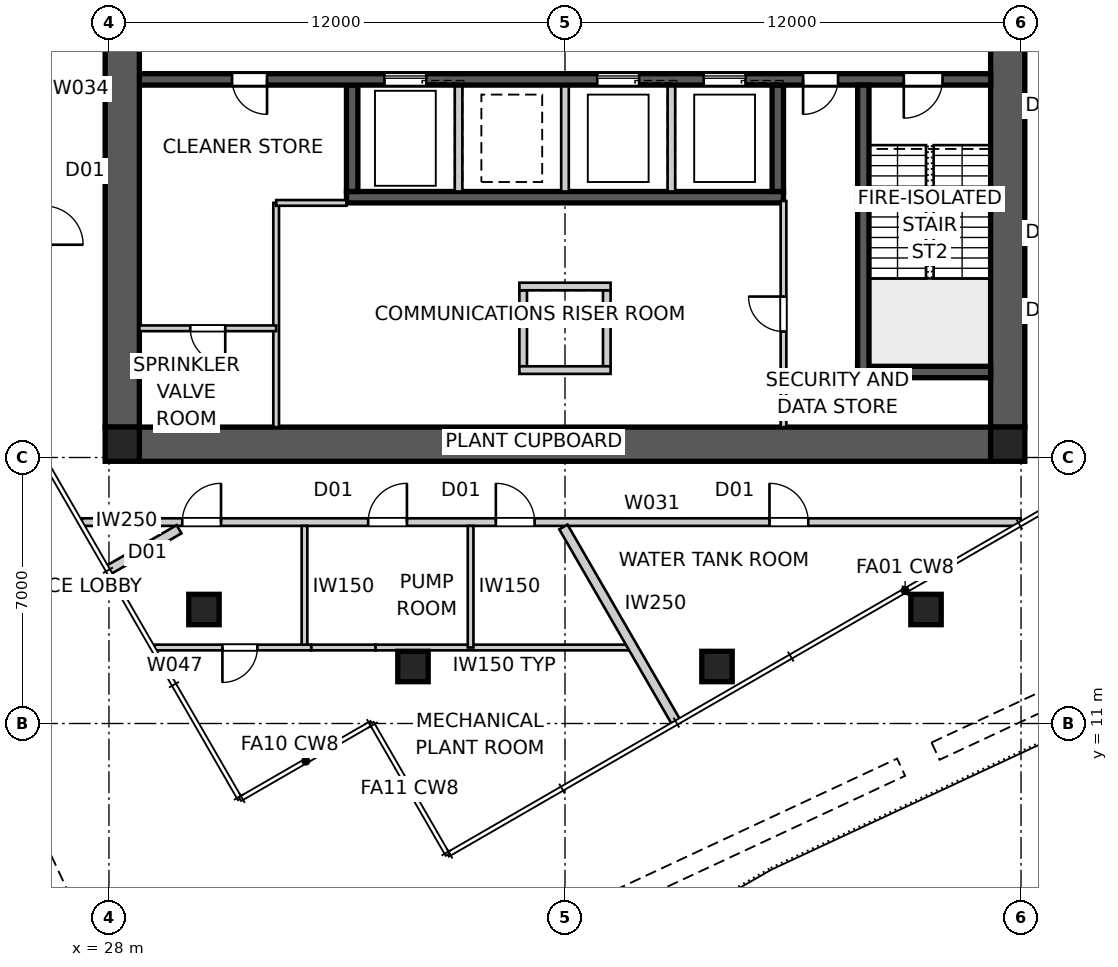
"""IFC4 building model, lengths in metres.
Left out: names, types, materials, properties, quantities, classifications, styles, units other than length and angle.
Written with IfcOpenShell. Run it as: python <this file> out.ifc"""

import sys

from ifc_helpers import new_model, si_unit, direction, frame, frame_2d, origin, origin_2d, place, context, subcontext, project, spatial, polyline, rectangle, outline, extrude, element, fill, save


model = new_model("IFC4")
c1 = context("Model", 3, precision=1e-05, world=origin(), true_north=direction((0.0, 1.0)))
c2 = subcontext(c1, "Body", "Model", "MODEL_VIEW")
j1 = project(units=[si_unit("LENGTHUNIT", "METRE"), si_unit("PLANEANGLEUNIT", "RADIAN")], contexts=[c1])
p1 = place(None, origin())
s1 = spatial("IfcSite", under=j1, at=p1, CompositionType="ELEMENT")
p2 = place(p1, origin())
s2 = spatial("IfcBuilding", under=s1, at=p2, CompositionType="ELEMENT")
p3 = place(p2, frame((0.0, 0.0, 203.2)))
s3 = spatial("IfcBuildingStorey", under=s2, at=p3, CompositionType="ELEMENT", Elevation=203.2)
p4 = place(p3, frame((51.2, 18.35, 0.0), z_axis=(0.0, 0.0, 1.0), x_axis=(-1.0, 0.0, 0.0)))
e1 = element("IfcWall", 1, at=p4, inside=s3, PredefinedType="SHEAR", context=c2, shape_type="SweptSolid", body=[
    extrude(outline(polyline([(0.0, -0.45), (22.4, -0.45), (22.4, -0.025), (22.85, -0.025), (22.85, 0.025), (22.4, 0.025), (22.4, 0.45), (0.0, 0.45), (0.0, 0.025), (-0.45, 0.025), (-0.45, -0.025), (0.0, -0.025), (0.0, -0.45)])), origin(), (0.0, 0.0, 1.0), 5.0),
])
p5 = place(p3, frame((51.65, 18.8, 0.0), z_axis=(0.0, 0.0, 1.0), x_axis=(0.0, 1.0, 0.0)))
e2 = element("IfcWall", 2, at=p5, inside=s3, PredefinedType="SHEAR", context=c2, shape_type="SweptSolid", body=[
    extrude(outline(polyline([(0.0, -0.45), (22.4, -0.45), (22.4, -0.025), (22.85, -0.025), (22.85, 0.025), (22.4, 0.025), (22.4, 0.45), (0.0, 0.45), (0.0, 0.025), (-0.45, 0.025), (-0.45, -0.025), (0.0, -0.025), (0.0, -0.45)])), origin(), (0.0, 0.0, 1.0), 5.0),
])
p6 = place(p5, frame((11.14, 0.0, 0.0)))
e3 = element("IfcOpeningElement", 3, at=p6, cuts=e2, PredefinedType="OPENING", context=c2, shape_type="SweptSolid", body=[
    extrude(rectangle(XDim=1.02, YDim=2.4, at=frame_2d((0.51, 1.2))), frame((0.0, 0.46, 0.0), z_axis=(0.0, -1.0, 0.0), x_axis=(1.0, 0.0, 0.0)), (0.0, 0.0, 1.0), 0.92),
])
p7 = place(p3, frame((28.35, 41.2, 0.0), z_axis=(0.0, 0.0, 1.0), x_axis=(0.0, -1.0, 0.0)))
e4 = element("IfcWall", 4, at=p7, inside=s3, PredefinedType="SHEAR", context=c2, shape_type="SweptSolid", body=[
    extrude(outline(polyline([(0.0, -0.45), (22.4, -0.45), (22.4, -0.025), (22.85, -0.025), (22.85, 0.025), (22.4, 0.025), (22.4, 0.45), (0.0, 0.45), (0.0, 0.025), (-0.45, 0.025), (-0.45, -0.025), (0.0, -0.025), (0.0, -0.45)])), origin(), (0.0, 0.0, 1.0), 5.0),
])
p8 = place(p7, frame((11.14, 0.0, 0.0)))
e5 = element("IfcOpeningElement", 5, at=p8, cuts=e4, PredefinedType="OPENING", context=c2, shape_type="SweptSolid", body=[
    extrude(rectangle(XDim=1.02, YDim=2.4, at=frame_2d((0.51, 1.2))), frame((0.0, 0.46, 0.0), z_axis=(0.0, -1.0, 0.0), x_axis=(1.0, 0.0, 0.0)), (0.0, 0.0, 1.0), 0.92),
])
p9 = place(p3, frame((51.2, 27.95, 0.0), z_axis=(0.0, 0.0, 1.0), x_axis=(-1.0, 0.0, 0.0)))
e6 = element("IfcWall", 6, at=p9, inside=s3, PredefinedType="SHEAR", context=c2, shape_type="SweptSolid", body=[
    extrude(rectangle(XDim=22.4, YDim=0.3, at=frame_2d((11.2, 0.0))), origin(), (0.0, 0.0, 1.0), 5.0),
])
p10 = place(p9, frame((19.04, 0.0, 0.0)))
e7 = element("IfcOpeningElement", 7, at=p10, cuts=e6, PredefinedType="OPENING", context=c2, shape_type="SweptSolid", body=[
    extrude(rectangle(XDim=0.92, YDim=2.1, at=frame_2d((0.46, 1.05))), frame((0.0, 0.16, 0.0), z_axis=(0.0, -1.0, 0.0), x_axis=(1.0, 0.0, 0.0)), (0.0, 0.0, 1.0), 0.32),
])
p11 = place(p9, frame((1.265, 0.0, 0.0)))
e8 = element("IfcOpeningElement", 8, at=p11, cuts=e6, PredefinedType="OPENING", context=c2, shape_type="SweptSolid", body=[
    extrude(rectangle(XDim=1.02, YDim=2.1, at=frame_2d((0.51, 1.05))), frame((0.0, 0.16, 0.0), z_axis=(0.0, -1.0, 0.0), x_axis=(1.0, 0.0, 0.0)), (0.0, 0.0, 1.0), 0.32),
])
p12 = place(p9, frame((4.015, 0.0, 0.0)))
e9 = element("IfcOpeningElement", 9, at=p12, cuts=e6, PredefinedType="OPENING", context=c2, shape_type="SweptSolid", body=[
    extrude(rectangle(XDim=0.92, YDim=2.1, at=frame_2d((0.46, 1.05))), frame((0.0, 0.16, 0.0), z_axis=(0.0, -1.0, 0.0), x_axis=(1.0, 0.0, 0.0)), (0.0, 0.0, 1.0), 0.32),
])
p13 = place(p9, frame((6.45, 0.0, 0.0)))
e10 = element("IfcOpeningElement", 10, at=p13, cuts=e6, PredefinedType="OPENING", context=c2, shape_type="SweptSolid", body=[
    extrude(rectangle(XDim=1.1, YDim=2.1, at=frame_2d((0.55, 1.05))), frame((0.0, 0.16, 0.0), z_axis=(0.0, -1.0, 0.0), x_axis=(1.0, 0.0, 0.0)), (0.0, 0.0, 1.0), 0.32),
])
p14 = place(p9, frame((9.25, 0.0, 0.0)))
e11 = element("IfcOpeningElement", 11, at=p14, cuts=e6, PredefinedType="OPENING", context=c2, shape_type="SweptSolid", body=[
    extrude(rectangle(XDim=1.1, YDim=2.1, at=frame_2d((0.55, 1.05))), frame((0.0, 0.16, 0.0), z_axis=(0.0, -1.0, 0.0), x_axis=(1.0, 0.0, 0.0)), (0.0, 0.0, 1.0), 0.32),
])
p15 = place(p9, frame((14.85, 0.0, 0.0)))
e12 = element("IfcOpeningElement", 12, at=p15, cuts=e6, PredefinedType="OPENING", context=c2, shape_type="SweptSolid", body=[
    extrude(rectangle(XDim=1.1, YDim=2.1, at=frame_2d((0.55, 1.05))), frame((0.0, 0.16, 0.0), z_axis=(0.0, -1.0, 0.0), x_axis=(1.0, 0.0, 0.0)), (0.0, 0.0, 1.0), 0.32),
])
p16 = place(p3, frame((45.75, 24.85, 0.0), z_axis=(0.0, 0.0, 1.0), x_axis=(-1.0, 0.0, 0.0)))
e13 = element("IfcWall", 13, at=p16, inside=s3, PredefinedType="SHEAR", context=c2, shape_type="SweptSolid", body=[
    extrude(rectangle(XDim=11.5, YDim=0.3, at=frame_2d((5.75, 0.0))), origin(), (0.0, 0.0, 1.0), 5.0),
])
p17 = place(p3, frame((45.6, 27.8, 0.0), z_axis=(0.0, 0.0, 1.0), x_axis=(0.0, -1.0, 0.0)))
e14 = element("IfcWall", 14, at=p17, inside=s3, PredefinedType="SHEAR", context=c2, shape_type="SweptSolid", body=[
    extrude(rectangle(XDim=2.8, YDim=0.3, at=frame_2d((1.4, 0.0))), origin(), (0.0, 0.0, 1.0), 5.0),
])
for number, where, z_axis, x_axis in (
    (15, (42.8, 27.8, 0.0), (0.0, 0.0, 1.0), (0.0, -1.0, 0.0)),
    (16, (40.0, 27.8, 0.0), (0.0, 0.0, 1.0), (0.0, -1.0, 0.0)),
    (17, (37.2, 27.8, 0.0), (0.0, 0.0, 1.0), (0.0, -1.0, 0.0)),
):
    element("IfcWall", number, at=place(p3, frame(where, z_axis=z_axis, x_axis=x_axis)), inside=s3, PredefinedType="SOLIDWALL", context=c2, shape_type="SweptSolid", body=[
        extrude(rectangle(XDim=2.8, YDim=0.2, at=frame_2d((1.4, 0.0))), origin(), (0.0, 0.0, 1.0), 5.0),
    ])
p18 = place(p3, frame((34.4, 27.8, 0.0), z_axis=(0.0, 0.0, 1.0), x_axis=(0.0, -1.0, 0.0)))
e18 = element("IfcWall", 18, at=p18, inside=s3, PredefinedType="SHEAR", context=c2, shape_type="SweptSolid", body=[
    extrude(rectangle(XDim=2.8, YDim=0.3, at=frame_2d((1.4, 0.0))), origin(), (0.0, 0.0, 1.0), 5.0),
])
p19 = place(p3, frame((47.85, 27.8, 0.0), z_axis=(0.0, 0.0, 1.0), x_axis=(0.0, -1.0, 0.0)))
e19 = element("IfcWall", 19, at=p19, inside=s3, PredefinedType="SHEAR", context=c2, shape_type="SweptSolid", body=[
    extrude(rectangle(XDim=7.7, YDim=0.3, at=frame_2d((3.85, 0.0))), origin(), (0.0, 0.0, 1.0), 5.0),
])
p20 = place(p3, frame((51.2, 20.25, 0.0), z_axis=(0.0, 0.0, 1.0), x_axis=(-1.0, 0.0, 0.0)))
e20 = element("IfcWall", 20, at=p20, inside=s3, PredefinedType="SHEAR", context=c2, shape_type="SweptSolid", body=[
    extrude(rectangle(XDim=3.5, YDim=0.3, at=frame_2d((1.75, 0.0))), origin(), (0.0, 0.0, 1.0), 5.0),
])
for number, where, z_axis, x_axis in (
    (21, (38.9, 22.4, 0.0), (0.0, 0.0, 1.0), (0.0, -1.0, 0.0)),
    (22, (41.1, 22.4, 0.0), (0.0, 0.0, 1.0), (0.0, -1.0, 0.0)),
):
    element("IfcWall", number, at=place(p3, frame(where, z_axis=z_axis, x_axis=x_axis)), inside=s3, PredefinedType="SOLIDWALL", context=c2, shape_type="SweptSolid", body=[
        extrude(rectangle(XDim=2.0, YDim=0.2, at=frame_2d((1.0, 0.0))), origin(), (0.0, 0.0, 1.0), 5.0),
    ])
for number, where, z_axis, x_axis in (
    (23, (38.8, 22.5, 0.0), (0.0, 0.0, 1.0), (1.0, 0.0, 0.0)),
    (24, (38.8, 20.3, 0.0), (0.0, 0.0, 1.0), (1.0, 0.0, 0.0)),
):
    element("IfcWall", number, at=place(p3, frame(where, z_axis=z_axis, x_axis=x_axis)), inside=s3, PredefinedType="SOLIDWALL", context=c2, shape_type="SweptSolid", body=[
        extrude(rectangle(XDim=2.4, YDim=0.2, at=frame_2d((1.2, 0.0))), origin(), (0.0, 0.0, 1.0), 5.0),
    ])
for number, where, z_axis, x_axis in (
    (25, (28.35, 18.35, 0.0), (0.0, 0.0, 1.0), (1.0, 0.0, 0.0)),
    (26, (51.65, 18.35, 0.0), (0.0, 0.0, 1.0), (1.0, 0.0, 0.0)),
):
    element("IfcColumn", number, at=place(p3, frame(where, z_axis=z_axis, x_axis=x_axis)), inside=s3, PredefinedType="COLUMN", context=c2, shape_type="SweptSolid", body=[
        extrude(rectangle(XDim=0.9, YDim=0.9, at=origin_2d()), origin(), (0.0, 0.0, 1.0), 5.0),
    ])
for number, where, z_axis, x_axis in (
    (27, (30.5, 14.0, 0.0), (0.0, 0.0, 1.0), (1.0, 0.0, 0.0)),
    (28, (36.0, 12.5, 0.0), (0.0, 0.0, 1.0), (1.0, 0.0, 0.0)),
    (29, (44.0, 12.5, 0.0), (0.0, 0.0, 1.0), (1.0, 0.0, 0.0)),
    (30, (49.5, 14.0, 0.0), (0.0, 0.0, 1.0), (1.0, 0.0, 0.0)),
):
    element("IfcColumn", number, at=place(p3, frame(where, z_axis=z_axis, x_axis=x_axis)), inside=s3, PredefinedType="COLUMN", context=c2, shape_type="SweptSolid", body=[
        extrude(rectangle(XDim=0.8, YDim=0.8, at=origin_2d()), origin(), (0.0, 0.0, 1.0), 5.0),
    ])
p21 = place(p3, frame((27.287, 16.3, 0.0), z_axis=(0.0, 0.0, 1.0), x_axis=(1.0, 0.0, 0.0)))
e31 = element("IfcWall", 31, at=p21, inside=s3, PredefinedType="PARTITIONING", context=c2, shape_type="SweptSolid", body=[
    extrude(rectangle(XDim=24.704, YDim=0.2, at=frame_2d((12.352, 0.0))), origin(), (0.0, 0.0, 1.0), 4.85),
])
p22 = place(p21, frame((18.094, 0.0, 0.0)))
e32 = element("IfcOpeningElement", 32, at=p22, cuts=e31, PredefinedType="OPENING", context=c2, shape_type="SweptSolid", body=[
    extrude(rectangle(XDim=1.02, YDim=2.34, at=frame_2d((0.51, 1.17))), frame((0.0, 0.11, 0.0), z_axis=(0.0, -1.0, 0.0), x_axis=(1.0, 0.0, 0.0)), (0.0, 0.0, 1.0), 0.22),
])
p23 = place(p21, frame((2.642, 0.0, 0.0)))
e33 = element("IfcOpeningElement", 33, at=p23, cuts=e31, PredefinedType="OPENING", context=c2, shape_type="SweptSolid", body=[
    extrude(rectangle(XDim=1.02, YDim=2.34, at=frame_2d((0.51, 1.17))), frame((0.0, 0.11, 0.0), z_axis=(0.0, -1.0, 0.0), x_axis=(1.0, 0.0, 0.0)), (0.0, 0.0, 1.0), 0.22),
])
p24 = place(p21, frame((7.534, 0.0, 0.0)))
e34 = element("IfcOpeningElement", 34, at=p24, cuts=e31, PredefinedType="OPENING", context=c2, shape_type="SweptSolid", body=[
    extrude(rectangle(XDim=1.02, YDim=2.34, at=frame_2d((0.51, 1.17))), frame((0.0, 0.11, 0.0), z_axis=(0.0, -1.0, 0.0), x_axis=(1.0, 0.0, 0.0)), (0.0, 0.0, 1.0), 0.22),
])
p25 = place(p21, frame((10.894, 0.0, 0.0)))
e35 = element("IfcOpeningElement", 35, at=p25, cuts=e31, PredefinedType="OPENING", context=c2, shape_type="SweptSolid", body=[
    extrude(rectangle(XDim=1.02, YDim=2.34, at=frame_2d((0.51, 1.17))), frame((0.0, 0.11, 0.0), z_axis=(0.0, -1.0, 0.0), x_axis=(1.0, 0.0, 0.0)), (0.0, 0.0, 1.0), 0.22),
])
p26 = place(p3, frame((42.931, 11.023, 0.0), z_axis=(0.0, 0.0, 1.0), x_axis=(-0.500021028785, 0.866013262469, 0.0)))
e36 = element("IfcWall", 36, at=p26, inside=s3, PredefinedType="PARTITIONING", context=c2, shape_type="SweptSolid", body=[
    extrude(rectangle(XDim=5.946, YDim=0.25, at=frame_2d((2.973, 0.0))), origin(), (0.0, 0.0, 1.0), 4.85),
])
p27 = place(p3, frame((27.973, 15.031, 0.0), z_axis=(0.0, 0.0, 1.0), x_axis=(0.865974878747, 0.500087501723, 0.0)))
e37 = element("IfcWall", 37, at=p27, inside=s3, PredefinedType="PARTITIONING", context=c2, shape_type="SweptSolid", body=[
    extrude(rectangle(XDim=2.161, YDim=0.25, at=frame_2d((1.081, 0.0))), origin(), (0.0, 0.0, 1.0), 4.85),
])
p28 = place(p3, frame((45.75, 18.8, 0.0), z_axis=(0.0, 0.0, 1.0), x_axis=(0.0, 1.0, 0.0)))
e38 = element("IfcWall", 38, at=p28, inside=s3, PredefinedType="SOLIDWALL", context=c2, shape_type="SweptSolid", body=[
    extrude(rectangle(XDim=5.95, YDim=0.15, at=frame_2d((2.975, 0.0))), origin(), (0.0, 0.0, 1.0), 4.85),
])
p29 = place(p28, frame((2.515, 0.0, 0.0)))
e39 = element("IfcOpeningElement", 39, at=p29, cuts=e38, PredefinedType="OPENING", context=c2, shape_type="SweptSolid", body=[
    extrude(rectangle(XDim=0.92, YDim=2.1, at=frame_2d((0.46, 1.05))), frame((0.0, 0.085, 0.0), z_axis=(0.0, -1.0, 0.0), x_axis=(1.0, 0.0, 0.0)), (0.0, 0.0, 1.0), 0.17),
])
p30 = place(p3, frame((32.4, 18.8, 0.0), z_axis=(0.0, 0.0, 1.0), x_axis=(0.0, 1.0, 0.0)))
e40 = element("IfcWall", 40, at=p30, inside=s3, PredefinedType="SOLIDWALL", context=c2, shape_type="SweptSolid", body=[
    extrude(rectangle(XDim=5.9, YDim=0.15, at=frame_2d((2.95, 0.0))), origin(), (0.0, 0.0, 1.0), 4.85),
])
p31 = place(p3, frame((32.4, 24.7, 0.0), z_axis=(0.0, 0.0, 1.0), x_axis=(1.0, 0.0, 0.0)))
e41 = element("IfcWall", 41, at=p31, inside=s3, PredefinedType="SOLIDWALL", context=c2, shape_type="SweptSolid", body=[
    extrude(rectangle(XDim=1.85, YDim=0.15, at=frame_2d((0.925, 0.0))), origin(), (0.0, 0.0, 1.0), 4.85),
])
p32 = place(p3, frame((32.4, 21.4, 0.0), z_axis=(0.0, 0.0, 1.0), x_axis=(-1.0, 0.0, 0.0)))
e42 = element("IfcWall", 42, at=p32, inside=s3, PredefinedType="SOLIDWALL", context=c2, shape_type="SweptSolid", body=[
    extrude(rectangle(XDim=3.6, YDim=0.15, at=frame_2d((1.8, 0.0))), origin(), (0.0, 0.0, 1.0), 4.85),
])
p33 = place(p32, frame((1.34, 0.0, 0.0)))
e43 = element("IfcOpeningElement", 43, at=p33, cuts=e42, PredefinedType="OPENING", context=c2, shape_type="SweptSolid", body=[
    extrude(rectangle(XDim=0.92, YDim=2.1, at=frame_2d((0.46, 1.05))), frame((0.0, 0.085, 0.0), z_axis=(0.0, -1.0, 0.0), x_axis=(1.0, 0.0, 0.0)), (0.0, 0.0, 1.0), 0.17),
])
p34 = place(p3, frame((33.145, 16.2, 0.0), z_axis=(0.0, 0.0, 1.0), x_axis=(0.0, -1.0, 0.0)))
e44 = element("IfcWall", 44, at=p34, inside=s3, PredefinedType="SOLIDWALL", context=c2, shape_type="SweptSolid", body=[
    extrude(rectangle(XDim=3.2, YDim=0.15, at=frame_2d((1.6, 0.0))), origin(), (0.0, 0.0, 1.0), 4.85),
])
p35 = place(p3, frame((41.79, 13.0, 0.0), z_axis=(0.0, 0.0, 1.0), x_axis=(-1.0, 0.0, 0.0)))
e45 = element("IfcWall", 45, at=p35, inside=s3, PredefinedType="SOLIDWALL", context=c2, shape_type="SweptSolid", body=[
    extrude(rectangle(XDim=6.778, YDim=0.15, at=frame_2d((3.389, 0.0))), origin(), (0.0, 0.0, 1.0), 4.85),
])
p36 = place(p3, frame((35.012, 13.0, 0.0), z_axis=(0.0, 0.0, 1.0), x_axis=(-1.0, 0.0, 0.0)))
e46 = element("IfcWall", 46, at=p36, inside=s3, PredefinedType="SOLIDWALL", context=c2, shape_type="SweptSolid", body=[
    extrude(rectangle(XDim=1.69, YDim=0.15, at=frame_2d((0.845, 0.0))), origin(), (0.0, 0.0, 1.0), 3.85),
])
p37 = place(p3, frame((33.322, 13.0, 0.0), z_axis=(0.0, 0.0, 1.0), x_axis=(-1.0, 0.0, 0.0)))
e47 = element("IfcWall", 47, at=p37, inside=s3, PredefinedType="SOLIDWALL", context=c2, shape_type="SweptSolid", body=[
    extrude(rectangle(XDim=4.13, YDim=0.15, at=frame_2d((2.065, 0.0))), origin(), (0.0, 0.0, 1.0), 4.85),
])
p38 = place(p37, frame((1.416, 0.0, 0.0)))
e48 = element("IfcOpeningElement", 48, at=p38, cuts=e47, PredefinedType="OPENING", context=c2, shape_type="SweptSolid", body=[
    extrude(rectangle(XDim=0.92, YDim=2.1, at=frame_2d((0.46, 1.05))), frame((0.0, 0.085, 0.0), z_axis=(0.0, -1.0, 0.0), x_axis=(1.0, 0.0, 0.0)), (0.0, 0.0, 1.0), 0.17),
])
p39 = place(p3, frame((37.516, 16.2, 0.0), z_axis=(0.0, 0.0, 1.0), x_axis=(0.0, -1.0, 0.0)))
e49 = element("IfcWall", 49, at=p39, inside=s3, PredefinedType="SOLIDWALL", context=c2, shape_type="SweptSolid", body=[
    extrude(rectangle(XDim=3.2, YDim=0.15, at=frame_2d((1.6, 0.0))), origin(), (0.0, 0.0, 1.0), 4.85),
])
p40 = place(p10, origin())
e50 = element("IfcDoor", 50, at=p40, inside=s3, OperationType="SINGLE_SWING_LEFT", PredefinedType="DOOR", context=c2, shape_type="SweptSolid", body=[
    extrude(rectangle(XDim=0.92, YDim=2.1, at=frame_2d((0.46, 1.05))), frame((0.0, 0.025, 0.0), z_axis=(0.0, -1.0, 0.0), x_axis=(1.0, 0.0, 0.0)), (0.0, 0.0, 1.0), 0.05),
])
fill(e7, e50)
p41 = place(p11, origin())
e51 = element("IfcDoor", 51, at=p41, inside=s3, OperationType="SINGLE_SWING_RIGHT", PredefinedType="DOOR", context=c2, shape_type="SweptSolid", body=[
    extrude(rectangle(XDim=1.02, YDim=2.1, at=frame_2d((0.51, 1.05))), frame((0.0, 0.025, 0.0), z_axis=(0.0, -1.0, 0.0), x_axis=(1.0, 0.0, 0.0)), (0.0, 0.0, 1.0), 0.05),
])
fill(e8, e51)
p42 = place(p12, origin())
e52 = element("IfcDoor", 52, at=p42, inside=s3, OperationType="SINGLE_SWING_RIGHT", PredefinedType="DOOR", context=c2, shape_type="SweptSolid", body=[
    extrude(rectangle(XDim=0.92, YDim=2.1, at=frame_2d((0.46, 1.05))), frame((0.0, 0.025, 0.0), z_axis=(0.0, -1.0, 0.0), x_axis=(1.0, 0.0, 0.0)), (0.0, 0.0, 1.0), 0.05),
])
fill(e9, e52)
p43 = place(p22, origin())
e53 = element("IfcDoor", 53, at=p43, inside=s3, OperationType="SINGLE_SWING_LEFT", PredefinedType="DOOR", context=c2, shape_type="SweptSolid", body=[
    extrude(rectangle(XDim=1.02, YDim=2.34, at=frame_2d((0.51, 1.17))), frame((0.0, 0.025, 0.0), z_axis=(0.0, -1.0, 0.0), x_axis=(1.0, 0.0, 0.0)), (0.0, 0.0, 1.0), 0.05),
])
fill(e32, e53)
p44 = place(p23, origin())
e54 = element("IfcDoor", 54, at=p44, inside=s3, OperationType="SINGLE_SWING_RIGHT", PredefinedType="DOOR", context=c2, shape_type="SweptSolid", body=[
    extrude(rectangle(XDim=1.02, YDim=2.34, at=frame_2d((0.51, 1.17))), frame((0.0, 0.025, 0.0), z_axis=(0.0, -1.0, 0.0), x_axis=(1.0, 0.0, 0.0)), (0.0, 0.0, 1.0), 0.05),
])
fill(e33, e54)
p45 = place(p24, origin())
e55 = element("IfcDoor", 55, at=p45, inside=s3, OperationType="SINGLE_SWING_RIGHT", PredefinedType="DOOR", context=c2, shape_type="SweptSolid", body=[
    extrude(rectangle(XDim=1.02, YDim=2.34, at=frame_2d((0.51, 1.17))), frame((0.0, 0.025, 0.0), z_axis=(0.0, -1.0, 0.0), x_axis=(1.0, 0.0, 0.0)), (0.0, 0.0, 1.0), 0.05),
])
fill(e34, e55)
p46 = place(p25, origin())
e56 = element("IfcDoor", 56, at=p46, inside=s3, OperationType="SINGLE_SWING_LEFT", PredefinedType="DOOR", context=c2, shape_type="SweptSolid", body=[
    extrude(rectangle(XDim=1.02, YDim=2.34, at=frame_2d((0.51, 1.17))), frame((0.0, 0.025, 0.0), z_axis=(0.0, -1.0, 0.0), x_axis=(1.0, 0.0, 0.0)), (0.0, 0.0, 1.0), 0.05),
])
fill(e35, e56)
p47 = place(p33, origin())
e57 = element("IfcDoor", 57, at=p47, inside=s3, OperationType="SINGLE_SWING_LEFT", PredefinedType="DOOR", context=c2, shape_type="SweptSolid", body=[
    extrude(rectangle(XDim=0.92, YDim=2.1, at=frame_2d((0.46, 1.05))), frame((0.0, 0.025, 0.0), z_axis=(0.0, -1.0, 0.0), x_axis=(1.0, 0.0, 0.0)), (0.0, 0.0, 1.0), 0.05),
])
fill(e43, e57)
p48 = place(p29, origin())
e58 = element("IfcDoor", 58, at=p48, inside=s3, OperationType="SINGLE_SWING_RIGHT", PredefinedType="DOOR", context=c2, shape_type="SweptSolid", body=[
    extrude(rectangle(XDim=0.92, YDim=2.1, at=frame_2d((0.46, 1.05))), frame((0.0, 0.025, 0.0), z_axis=(0.0, -1.0, 0.0), x_axis=(1.0, 0.0, 0.0)), (0.0, 0.0, 1.0), 0.05),
])
fill(e39, e58)
p49 = place(p38, origin())
e59 = element("IfcDoor", 59, at=p49, inside=s3, OperationType="SINGLE_SWING_RIGHT", PredefinedType="DOOR", context=c2, shape_type="SweptSolid", body=[
    extrude(rectangle(XDim=0.92, YDim=2.1, at=frame_2d((0.46, 1.05))), frame((0.0, 0.025, 0.0), z_axis=(0.0, -1.0, 0.0), x_axis=(1.0, 0.0, 0.0)), (0.0, 0.0, 1.0), 0.05),
])
fill(e48, e59)
p50 = place(p13, origin())
e60 = element("IfcDoor", 60, at=p50, inside=s3, OperationType="SLIDING_TO_LEFT", PredefinedType="DOOR", context=c2, shape_type="SweptSolid", body=[
    extrude(rectangle(XDim=1.1, YDim=2.1, at=frame_2d((0.55, 1.05))), frame((0.0, 0.025, 0.0), z_axis=(0.0, -1.0, 0.0), x_axis=(1.0, 0.0, 0.0)), (0.0, 0.0, 1.0), 0.05),
])
fill(e10, e60)
p51 = place(p14, origin())
e61 = element("IfcDoor", 61, at=p51, inside=s3, OperationType="SLIDING_TO_LEFT", PredefinedType="DOOR", context=c2, shape_type="SweptSolid", body=[
    extrude(rectangle(XDim=1.1, YDim=2.1, at=frame_2d((0.55, 1.05))), frame((0.0, 0.025, 0.0), z_axis=(0.0, -1.0, 0.0), x_axis=(1.0, 0.0, 0.0)), (0.0, 0.0, 1.0), 0.05),
])
fill(e11, e61)
p52 = place(p15, origin())
e62 = element("IfcDoor", 62, at=p52, inside=s3, OperationType="SLIDING_TO_LEFT", PredefinedType="DOOR", context=c2, shape_type="SweptSolid", body=[
    extrude(rectangle(XDim=1.1, YDim=2.1, at=frame_2d((0.55, 1.05))), frame((0.0, 0.025, 0.0), z_axis=(0.0, -1.0, 0.0), x_axis=(1.0, 0.0, 0.0)), (0.0, 0.0, 1.0), 0.05),
])
fill(e12, e62)
save(model, sys.argv[1])
